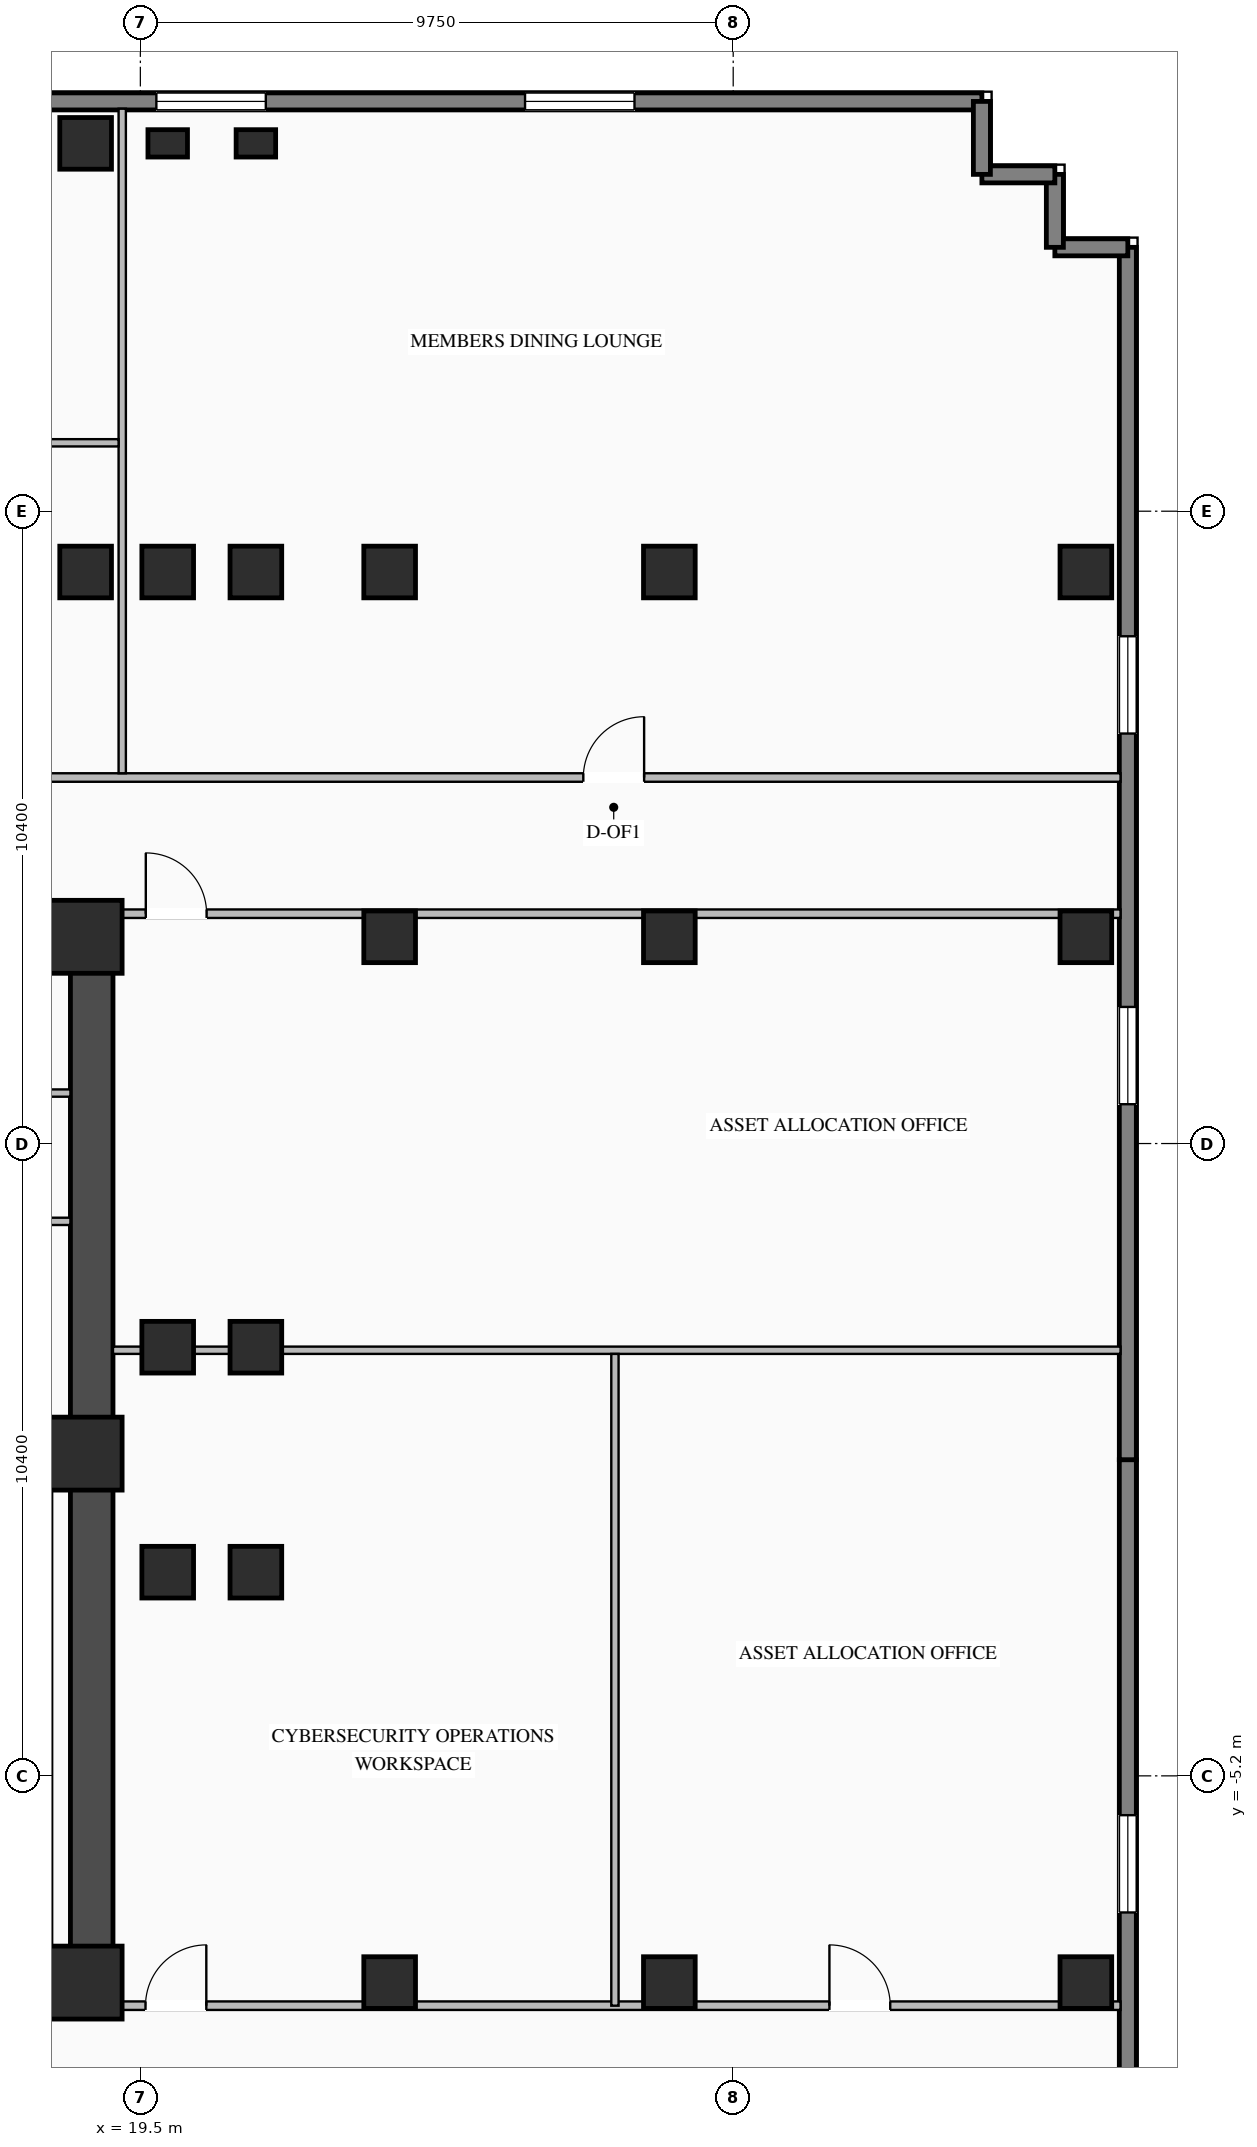
"""IFC4 building model, lengths in metres.
Left out: names, types, materials, properties, quantities, classifications, styles, units other than length and angle.
Written with IfcOpenShell. Run it as: python <this file> out.ifc"""

import sys

from ifc_helpers import new_model, si_unit, direction, frame, frame_2d, origin, origin_2d, place, context, subcontext, project, spatial, rectangle, i_section, extrude, element, fill, save


model = new_model("IFC4")
c1 = context("Model", 3, precision=1e-05, world=origin(), true_north=direction((0.0, 1.0)))
c2 = subcontext(c1, "Body", "Model", "MODEL_VIEW")
j1 = project(units=[si_unit("LENGTHUNIT", "METRE"), si_unit("PLANEANGLEUNIT", "RADIAN")], contexts=[c1])
p1 = place(None, origin())
s1 = spatial("IfcSite", under=j1, at=p1, CompositionType="ELEMENT")
p2 = place(p1, origin())
s2 = spatial("IfcBuilding", under=s1, at=p2, CompositionType="ELEMENT")
p3 = place(p2, frame((0.0, 0.0, 51.9)))
s3 = spatial("IfcBuildingStorey", under=s2, at=p3, CompositionType="ELEMENT", Elevation=51.9)
p4 = place(p3, frame((8.8, -8.7, 0.0), z_axis=(0.0, 0.0, 1.0), x_axis=(1.0, 0.0, 0.0)))
e1 = element("IfcWall", 1, at=p4, inside=s3, PredefinedType="SHEAR", context=c2, shape_type="SweptSolid", body=[
    extrude(rectangle(XDim=10.25, YDim=0.7, at=frame_2d((5.125, 0.0))), origin(), (0.0, 0.0, 1.0), 3.27),
])
p5 = place(p3, frame((8.8, 8.7, 0.0), z_axis=(0.0, 0.0, 1.0), x_axis=(1.0, 0.0, 0.0)))
e2 = element("IfcWall", 2, at=p5, inside=s3, PredefinedType="SHEAR", context=c2, shape_type="SweptSolid", body=[
    extrude(rectangle(XDim=10.25, YDim=0.7, at=frame_2d((5.125, 0.0))), origin(), (0.0, 0.0, 1.0), 3.27),
])
p6 = place(p5, frame((3.25, 0.0, 0.0)))
e3 = element("IfcOpeningElement", 3, at=p6, cuts=e2, PredefinedType="OPENING", context=c2, shape_type="SweptSolid", body=[
    extrude(rectangle(XDim=1.4, YDim=2.05, at=frame_2d((0.7, 1.025))), frame((0.0, 0.36, 0.0), z_axis=(0.0, -1.0, 0.0), x_axis=(1.0, 0.0, 0.0)), (0.0, 0.0, 1.0), 0.72),
])
p7 = place(p3, frame((18.7, -8.35, 0.0), z_axis=(0.0, 0.0, 1.0), x_axis=(0.0, 1.0, 0.0)))
e4 = element("IfcWall", 4, at=p7, inside=s3, PredefinedType="SHEAR", context=c2, shape_type="SweptSolid", body=[
    extrude(rectangle(XDim=16.7, YDim=0.7, at=frame_2d((8.35, 0.0))), origin(), (0.0, 0.0, 1.0), 3.27),
])
for number, where, z_axis, x_axis in (
    (5, (18.6, -8.6, 0.0), (0.0, 0.0, 1.0), (1.0, 0.0, 0.0)),
    (6, (18.6, 0.1, 0.0), (0.0, 0.0, 1.0), (1.0, 0.0, 0.0)),
    (7, (18.6, 8.6, 0.0), (0.0, 0.0, 1.0), (1.0, 0.0, 0.0)),
):
    element("IfcColumn", number, at=place(p3, frame(where, z_axis=z_axis, x_axis=x_axis)), inside=s3, PredefinedType="COLUMN", context=c2, shape_type="SweptSolid", body=[
        extrude(rectangle(XDim=1.2, YDim=1.2, at=origin_2d()), origin(), (0.0, 0.0, 1.0), 3.45),
    ])
for number, where, z_axis, x_axis in (
    (8, (18.6, 14.6, 0.0), (0.0, 0.0, 1.0), (1.0, 0.0, 0.0)),
    (9, (19.95, 14.6, 0.0), (0.0, 0.0, 1.0), (1.0, 0.0, 0.0)),
    (10, (21.4, 14.6, 0.0), (0.0, 0.0, 1.0), (1.0, 0.0, 0.0)),
    (11, (19.95, -1.85, 0.0), (0.0, 0.0, 1.0), (1.0, 0.0, 0.0)),
    (12, (19.95, 1.85, 0.0), (0.0, 0.0, 1.0), (1.0, 0.0, 0.0)),
    (13, (21.4, -1.85, 0.0), (0.0, 0.0, 1.0), (1.0, 0.0, 0.0)),
    (14, (21.4, 1.85, 0.0), (0.0, 0.0, 1.0), (1.0, 0.0, 0.0)),
    (15, (23.6, -8.6, 0.0), (0.0, 0.0, 1.0), (1.0, 0.0, 0.0)),
    (16, (23.6, 8.6, 0.0), (0.0, 0.0, 1.0), (1.0, 0.0, 0.0)),
    (17, (23.6, 14.6, 0.0), (0.0, 0.0, 1.0), (1.0, 0.0, 0.0)),
    (18, (28.2, -8.6, 0.0), (0.0, 0.0, 1.0), (1.0, 0.0, 0.0)),
    (19, (28.2, 8.6, 0.0), (0.0, 0.0, 1.0), (1.0, 0.0, 0.0)),
    (20, (28.2, 14.6, 0.0), (0.0, 0.0, 1.0), (1.0, 0.0, 0.0)),
    (21, (18.6, 21.65, 0.0), (0.0, 0.0, 1.0), (1.0, 0.0, 0.0)),
    (22, (35.05, -8.6, 0.0), (0.0, 0.0, 1.0), (1.0, 0.0, 0.0)),
    (23, (35.05, 8.6, 0.0), (0.0, 0.0, 1.0), (1.0, 0.0, 0.0)),
    (24, (35.05, 14.6, 0.0), (0.0, 0.0, 1.0), (1.0, 0.0, 0.0)),
):
    element("IfcColumn", number, at=place(p3, frame(where, z_axis=z_axis, x_axis=x_axis)), inside=s3, PredefinedType="COLUMN", context=c2, shape_type="SweptSolid", body=[
        extrude(i_section(OverallWidth=0.85, OverallDepth=0.85, WebThickness=0.032, FlangeThickness=0.048, at=origin_2d()), origin(), (0.0, 0.0, 1.0), 3.45),
    ])
for number, where, z_axis, x_axis in (
    (25, (19.95, 21.65, 0.0), (0.0, 0.0, 1.0), (1.0, 0.0, 0.0)),
    (26, (21.4, 21.65, 0.0), (0.0, 0.0, 1.0), (1.0, 0.0, 0.0)),
):
    element("IfcColumn", number, at=place(p3, frame(where, z_axis=z_axis, x_axis=x_axis)), inside=s3, PredefinedType="PILASTER", context=c2, shape_type="SweptSolid", body=[
        extrude(rectangle(XDim=0.65, YDim=0.45, at=origin_2d()), origin(), (0.0, 0.0, 1.0), 3.45),
    ])
p8 = place(p3, frame((13.5, 22.34, 0.0), z_axis=(0.0, 0.0, 1.0), x_axis=(1.0, 0.0, 0.0)))
e27 = element("IfcWall", 27, at=p8, inside=s3, PredefinedType="STANDARD", context=c2, shape_type="SweptSolid", body=[
    extrude(rectangle(XDim=19.84, YDim=0.28, at=frame_2d((9.92, 0.0))), origin(), (0.0, 0.0, 1.0), 3.25),
])
p9 = place(p8, frame((6.263, 0.0, 0.76)))
e28 = element("IfcOpeningElement", 28, at=p9, cuts=e27, PredefinedType="OPENING", context=c2, shape_type="SweptSolid", body=[
    extrude(rectangle(XDim=1.8, YDim=1.95, at=frame_2d((0.9, 0.975))), frame((0.0, 0.15, 0.0), z_axis=(0.0, -1.0, 0.0), x_axis=(1.0, 0.0, 0.0)), (0.0, 0.0, 1.0), 0.3),
])
p10 = place(p8, frame((12.327, 0.0, 0.76)))
e29 = element("IfcOpeningElement", 29, at=p10, cuts=e27, PredefinedType="OPENING", context=c2, shape_type="SweptSolid", body=[
    extrude(rectangle(XDim=1.8, YDim=1.95, at=frame_2d((0.9, 0.975))), frame((0.0, 0.15, 0.0), z_axis=(0.0, -1.0, 0.0), x_axis=(1.0, 0.0, 0.0)), (0.0, 0.0, 1.0), 0.3),
])
p11 = place(p3, frame((35.74, 0.0, 0.0), z_axis=(0.0, 0.0, 1.0), x_axis=(0.0, -1.0, 0.0)))
e30 = element("IfcWall", 30, at=p11, inside=s3, PredefinedType="STANDARD", context=c2, shape_type="SweptSolid", body=[
    extrude(rectangle(XDim=19.94, YDim=0.28, at=frame_2d((9.97, 0.0))), origin(), (0.0, 0.0, 1.0), 3.25),
])
p12 = place(p11, frame((5.847, 0.0, 0.76)))
e31 = element("IfcOpeningElement", 31, at=p12, cuts=e30, PredefinedType="OPENING", context=c2, shape_type="SweptSolid", body=[
    extrude(rectangle(XDim=1.6, YDim=1.95, at=frame_2d((0.8, 0.975))), frame((0.0, 0.15, 0.0), z_axis=(0.0, -1.0, 0.0), x_axis=(1.0, 0.0, 0.0)), (0.0, 0.0, 1.0), 0.3),
])
p13 = place(p11, frame((11.943, 0.0, 0.76)))
e32 = element("IfcOpeningElement", 32, at=p13, cuts=e30, PredefinedType="OPENING", context=c2, shape_type="SweptSolid", body=[
    extrude(rectangle(XDim=1.6, YDim=1.95, at=frame_2d((0.8, 0.975))), frame((0.0, 0.15, 0.0), z_axis=(0.0, -1.0, 0.0), x_axis=(1.0, 0.0, 0.0)), (0.0, 0.0, 1.0), 0.3),
])
p14 = place(p3, frame((35.74, 19.94, 0.0), z_axis=(0.0, 0.0, 1.0), x_axis=(0.0, -1.0, 0.0)))
e33 = element("IfcWall", 33, at=p14, inside=s3, PredefinedType="STANDARD", context=c2, shape_type="SweptSolid", body=[
    extrude(rectangle(XDim=19.94, YDim=0.28, at=frame_2d((9.97, 0.0))), origin(), (0.0, 0.0, 1.0), 3.25),
])
p15 = place(p14, frame((6.397, 0.0, 0.76)))
e34 = element("IfcOpeningElement", 34, at=p15, cuts=e33, PredefinedType="OPENING", context=c2, shape_type="SweptSolid", body=[
    extrude(rectangle(XDim=1.6, YDim=1.95, at=frame_2d((0.8, 0.975))), frame((0.0, 0.15, 0.0), z_axis=(0.0, -1.0, 0.0), x_axis=(1.0, 0.0, 0.0)), (0.0, 0.0, 1.0), 0.3),
])
p16 = place(p14, frame((12.493, 0.0, 0.76)))
e35 = element("IfcOpeningElement", 35, at=p16, cuts=e33, PredefinedType="OPENING", context=c2, shape_type="SweptSolid", body=[
    extrude(rectangle(XDim=1.6, YDim=1.95, at=frame_2d((0.8, 0.975))), frame((0.0, 0.15, 0.0), z_axis=(0.0, -1.0, 0.0), x_axis=(1.0, 0.0, 0.0)), (0.0, 0.0, 1.0), 0.3),
])
for number, where, z_axis, x_axis in (
    (36, (35.74, 19.94, 0.0), (0.0, 0.0, 1.0), (-1.0, 0.0, 0.0)),
    (37, (34.54, 19.94, 0.0), (0.0, 0.0, 1.0), (0.0, 1.0, 0.0)),
    (38, (34.54, 21.14, 0.0), (0.0, 0.0, 1.0), (-1.0, 0.0, 0.0)),
):
    element("IfcWall", number, at=place(p3, frame(where, z_axis=z_axis, x_axis=x_axis)), inside=s3, PredefinedType="STANDARD", context=c2, shape_type="SweptSolid", body=[
        extrude(rectangle(XDim=1.2, YDim=0.28, at=frame_2d((0.6, 0.0))), origin(), (0.0, 0.0, 1.0), 3.25),
    ])
p17 = place(p3, frame((33.34, 21.14, 0.0), z_axis=(0.0, 0.0, 1.0), x_axis=(0.0, 1.0, 0.0)))
e39 = element("IfcWall", 39, at=p17, inside=s3, PredefinedType="STANDARD", context=c2, shape_type="SweptSolid", body=[
    extrude(rectangle(XDim=1.2, YDim=0.28, at=frame_2d((0.6, 0.0))), origin(), (0.0, 0.0, 1.0), 3.25),
])
p18 = place(p3, frame((13.9, 3.92, 0.0), z_axis=(0.0, 0.0, 1.0), x_axis=(1.0, 0.0, 0.0)))
e40 = element("IfcWall", 40, at=p18, inside=s3, PredefinedType="STANDARD", context=c2, shape_type="SweptSolid", body=[
    extrude(rectangle(XDim=4.45, YDim=0.12, at=frame_2d((2.225, 0.0))), origin(), (0.0, 0.0, 1.0), 3.25),
])
p19 = place(p3, frame((16.15, 6.03, 0.0), z_axis=(0.0, 0.0, 1.0), x_axis=(1.0, 0.0, 0.0)))
e41 = element("IfcWall", 41, at=p19, inside=s3, PredefinedType="STANDARD", context=c2, shape_type="SweptSolid", body=[
    extrude(rectangle(XDim=2.2, YDim=0.12, at=frame_2d((1.1, 0.0))), origin(), (0.0, 0.0, 1.0), 3.25),
])
p20 = place(p3, frame((-35.62, 11.22, 0.0), z_axis=(0.0, 0.0, 1.0), x_axis=(1.0, 0.0, 0.0)))
e42 = element("IfcWall", 42, at=p20, inside=s3, PredefinedType="STANDARD", context=c2, shape_type="SweptSolid", body=[
    extrude(rectangle(XDim=71.24, YDim=0.14, at=frame_2d((35.62, 0.0))), origin(), (0.0, 0.0, 1.0), 3.25),
])
p21 = place(p20, frame((7.835, 0.0, 0.0)))
e43 = element("IfcOpeningElement", 43, at=p21, cuts=e42, PredefinedType="OPENING", context=c2, shape_type="SweptSolid", body=[
    extrude(rectangle(XDim=1.0, YDim=2.08, at=frame_2d((0.5, 1.04))), frame((0.0, 0.08, 0.0), z_axis=(0.0, -1.0, 0.0), x_axis=(1.0, 0.0, 0.0)), (0.0, 0.0, 1.0), 0.16),
])
p22 = place(p20, frame((25.519, 0.0, 0.0)))
e44 = element("IfcOpeningElement", 44, at=p22, cuts=e42, PredefinedType="OPENING", context=c2, shape_type="SweptSolid", body=[
    extrude(rectangle(XDim=1.0, YDim=2.08, at=frame_2d((0.5, 1.04))), frame((0.0, 0.08, 0.0), z_axis=(0.0, -1.0, 0.0), x_axis=(1.0, 0.0, 0.0)), (0.0, 0.0, 1.0), 0.16),
])
p23 = place(p20, frame((44.721, 0.0, 0.0)))
e45 = element("IfcOpeningElement", 45, at=p23, cuts=e42, PredefinedType="OPENING", context=c2, shape_type="SweptSolid", body=[
    extrude(rectangle(XDim=1.0, YDim=2.08, at=frame_2d((0.5, 1.04))), frame((0.0, 0.08, 0.0), z_axis=(0.0, -1.0, 0.0), x_axis=(1.0, 0.0, 0.0)), (0.0, 0.0, 1.0), 0.16),
])
p24 = place(p20, frame((62.405, 0.0, 0.0)))
e46 = element("IfcOpeningElement", 46, at=p24, cuts=e42, PredefinedType="OPENING", context=c2, shape_type="SweptSolid", body=[
    extrude(rectangle(XDim=1.0, YDim=2.08, at=frame_2d((0.5, 1.04))), frame((0.0, 0.08, 0.0), z_axis=(0.0, -1.0, 0.0), x_axis=(1.0, 0.0, 0.0)), (0.0, 0.0, 1.0), 0.16),
])
p25 = place(p3, frame((19.202, 11.29, 0.0), z_axis=(0.0, 0.0, 1.0), x_axis=(0.0, 1.0, 0.0)))
e47 = element("IfcWall", 47, at=p25, inside=s3, PredefinedType="STANDARD", context=c2, shape_type="SweptSolid", body=[
    extrude(rectangle(XDim=10.93, YDim=0.12, at=frame_2d((5.465, 0.0))), origin(), (0.0, 0.0, 1.0), 3.25),
])
p26 = place(p3, frame((-19.142, 16.725, 0.0), z_axis=(0.0, 0.0, 1.0), x_axis=(1.0, 0.0, 0.0)))
e48 = element("IfcWall", 48, at=p26, inside=s3, PredefinedType="STANDARD", context=c2, shape_type="SweptSolid", body=[
    extrude(rectangle(XDim=38.284, YDim=0.12, at=frame_2d((19.142, 0.0))), origin(), (0.0, 0.0, 1.0), 3.25),
])
p27 = place(p26, frame((9.198, 0.0, 0.0)))
e49 = element("IfcOpeningElement", 49, at=p27, cuts=e48, PredefinedType="OPENING", context=c2, shape_type="SweptSolid", body=[
    extrude(rectangle(XDim=1.0, YDim=2.08, at=frame_2d((0.5, 1.04))), frame((0.0, 0.07, 0.0), z_axis=(0.0, -1.0, 0.0), x_axis=(1.0, 0.0, 0.0)), (0.0, 0.0, 1.0), 0.14),
])
p28 = place(p26, frame((28.086, 0.0, 0.0)))
e50 = element("IfcOpeningElement", 50, at=p28, cuts=e48, PredefinedType="OPENING", context=c2, shape_type="SweptSolid", body=[
    extrude(rectangle(XDim=1.0, YDim=2.08, at=frame_2d((0.5, 1.04))), frame((0.0, 0.07, 0.0), z_axis=(0.0, -1.0, 0.0), x_axis=(1.0, 0.0, 0.0)), (0.0, 0.0, 1.0), 0.14),
])
p29 = place(p3, frame((19.05, 8.98, 0.0), z_axis=(0.0, 0.0, 1.0), x_axis=(1.0, 0.0, 0.0)))
e51 = element("IfcWall", 51, at=p29, inside=s3, PredefinedType="STANDARD", context=c2, shape_type="SweptSolid", body=[
    extrude(rectangle(XDim=16.57, YDim=0.14, at=frame_2d((8.285, 0.0))), origin(), (0.0, 0.0, 1.0), 3.25),
])
p30 = place(p29, frame((0.54, 0.0, 0.0)))
e52 = element("IfcOpeningElement", 52, at=p30, cuts=e51, PredefinedType="OPENING", context=c2, shape_type="SweptSolid", body=[
    extrude(rectangle(XDim=1.0, YDim=2.08, at=frame_2d((0.5, 1.04))), frame((0.0, 0.08, 0.0), z_axis=(0.0, -1.0, 0.0), x_axis=(1.0, 0.0, 0.0)), (0.0, 0.0, 1.0), 0.16),
])
p31 = place(p3, frame((19.05, -8.98, 0.0), z_axis=(0.0, 0.0, 1.0), x_axis=(1.0, 0.0, 0.0)))
e53 = element("IfcWall", 53, at=p31, inside=s3, PredefinedType="STANDARD", context=c2, shape_type="SweptSolid", body=[
    extrude(rectangle(XDim=16.57, YDim=0.14, at=frame_2d((8.285, 0.0))), origin(), (0.0, 0.0, 1.0), 3.25),
])
p32 = place(p31, frame((0.535, 0.0, 0.0)))
e54 = element("IfcOpeningElement", 54, at=p32, cuts=e53, PredefinedType="OPENING", context=c2, shape_type="SweptSolid", body=[
    extrude(rectangle(XDim=1.0, YDim=2.08, at=frame_2d((0.5, 1.04))), frame((0.0, 0.08, 0.0), z_axis=(0.0, -1.0, 0.0), x_axis=(1.0, 0.0, 0.0)), (0.0, 0.0, 1.0), 0.16),
])
p33 = place(p31, frame((11.782, 0.0, 0.0)))
e55 = element("IfcOpeningElement", 55, at=p33, cuts=e53, PredefinedType="OPENING", context=c2, shape_type="SweptSolid", body=[
    extrude(rectangle(XDim=1.0, YDim=2.08, at=frame_2d((0.5, 1.04))), frame((0.0, 0.08, 0.0), z_axis=(0.0, -1.0, 0.0), x_axis=(1.0, 0.0, 0.0)), (0.0, 0.0, 1.0), 0.16),
])
p34 = place(p3, frame((19.05, 1.8, 0.0), z_axis=(0.0, 0.0, 1.0), x_axis=(1.0, 0.0, 0.0)))
e56 = element("IfcWall", 56, at=p34, inside=s3, PredefinedType="STANDARD", context=c2, shape_type="SweptSolid", body=[
    extrude(rectangle(XDim=16.57, YDim=0.12, at=frame_2d((8.285, 0.0))), origin(), (0.0, 0.0, 1.0), 3.25),
])
p35 = place(p3, frame((27.305, -8.98, 0.0), z_axis=(0.0, 0.0, 1.0), x_axis=(0.0, 1.0, 0.0)))
e57 = element("IfcWall", 57, at=p35, inside=s3, PredefinedType="STANDARD", context=c2, shape_type="SweptSolid", body=[
    extrude(rectangle(XDim=10.72, YDim=0.12, at=frame_2d((5.36, 0.0))), origin(), (0.0, 0.0, 1.0), 3.25),
])
p36 = place(p9, origin())
e58 = element("IfcWindow", 58, at=p36, inside=s3, PartitioningType="SINGLE_PANEL", PredefinedType="WINDOW", context=c2, shape_type="SweptSolid", body=[
    extrude(rectangle(XDim=1.8, YDim=1.95, at=frame_2d((0.9, 0.975))), frame((0.0, 0.03, 0.0), z_axis=(0.0, -1.0, 0.0), x_axis=(1.0, 0.0, 0.0)), (0.0, 0.0, 1.0), 0.06),
])
fill(e28, e58)
p37 = place(p10, origin())
e59 = element("IfcWindow", 59, at=p37, inside=s3, PartitioningType="SINGLE_PANEL", PredefinedType="WINDOW", context=c2, shape_type="SweptSolid", body=[
    extrude(rectangle(XDim=1.8, YDim=1.95, at=frame_2d((0.9, 0.975))), frame((0.0, 0.03, 0.0), z_axis=(0.0, -1.0, 0.0), x_axis=(1.0, 0.0, 0.0)), (0.0, 0.0, 1.0), 0.06),
])
fill(e29, e59)
p38 = place(p12, origin())
e60 = element("IfcWindow", 60, at=p38, inside=s3, PartitioningType="SINGLE_PANEL", PredefinedType="WINDOW", context=c2, shape_type="SweptSolid", body=[
    extrude(rectangle(XDim=1.6, YDim=1.95, at=frame_2d((0.8, 0.975))), frame((0.0, 0.03, 0.0), z_axis=(0.0, -1.0, 0.0), x_axis=(1.0, 0.0, 0.0)), (0.0, 0.0, 1.0), 0.06),
])
fill(e31, e60)
p39 = place(p15, origin())
e61 = element("IfcWindow", 61, at=p39, inside=s3, PartitioningType="SINGLE_PANEL", PredefinedType="WINDOW", context=c2, shape_type="SweptSolid", body=[
    extrude(rectangle(XDim=1.6, YDim=1.95, at=frame_2d((0.8, 0.975))), frame((0.0, 0.03, 0.0), z_axis=(0.0, -1.0, 0.0), x_axis=(1.0, 0.0, 0.0)), (0.0, 0.0, 1.0), 0.06),
])
fill(e34, e61)
p40 = place(p16, origin())
e62 = element("IfcWindow", 62, at=p40, inside=s3, PartitioningType="SINGLE_PANEL", PredefinedType="WINDOW", context=c2, shape_type="SweptSolid", body=[
    extrude(rectangle(XDim=1.6, YDim=1.95, at=frame_2d((0.8, 0.975))), frame((0.0, 0.03, 0.0), z_axis=(0.0, -1.0, 0.0), x_axis=(1.0, 0.0, 0.0)), (0.0, 0.0, 1.0), 0.06),
])
fill(e35, e62)
p41 = place(p24, origin())
e63 = element("IfcDoor", 63, at=p41, inside=s3, OperationType="SINGLE_SWING_RIGHT", PredefinedType="DOOR", context=c2, shape_type="SweptSolid", body=[
    extrude(rectangle(XDim=1.0, YDim=2.08, at=frame_2d((0.5, 1.04))), frame((0.0, 0.025, 0.0), z_axis=(0.0, -1.0, 0.0), x_axis=(1.0, 0.0, 0.0)), (0.0, 0.0, 1.0), 0.05),
])
fill(e46, e63)
p42 = place(p30, origin())
e64 = element("IfcDoor", 64, at=p42, inside=s3, OperationType="SINGLE_SWING_LEFT", PredefinedType="DOOR", context=c2, shape_type="SweptSolid", body=[
    extrude(rectangle(XDim=1.0, YDim=2.08, at=frame_2d((0.5, 1.04))), frame((0.0, 0.025, 0.0), z_axis=(0.0, -1.0, 0.0), x_axis=(1.0, 0.0, 0.0)), (0.0, 0.0, 1.0), 0.05),
])
fill(e52, e64)
p43 = place(p32, origin())
e65 = element("IfcDoor", 65, at=p43, inside=s3, OperationType="SINGLE_SWING_RIGHT", PredefinedType="DOOR", context=c2, shape_type="SweptSolid", body=[
    extrude(rectangle(XDim=1.0, YDim=2.08, at=frame_2d((0.5, 1.04))), frame((0.0, 0.025, 0.0), z_axis=(0.0, -1.0, 0.0), x_axis=(1.0, 0.0, 0.0)), (0.0, 0.0, 1.0), 0.05),
])
fill(e54, e65)
p44 = place(p33, origin())
e66 = element("IfcDoor", 66, at=p44, inside=s3, OperationType="SINGLE_SWING_LEFT", PredefinedType="DOOR", context=c2, shape_type="SweptSolid", body=[
    extrude(rectangle(XDim=1.0, YDim=2.08, at=frame_2d((0.5, 1.04))), frame((0.0, 0.025, 0.0), z_axis=(0.0, -1.0, 0.0), x_axis=(1.0, 0.0, 0.0)), (0.0, 0.0, 1.0), 0.05),
])
fill(e55, e66)
save(model, sys.argv[1])
